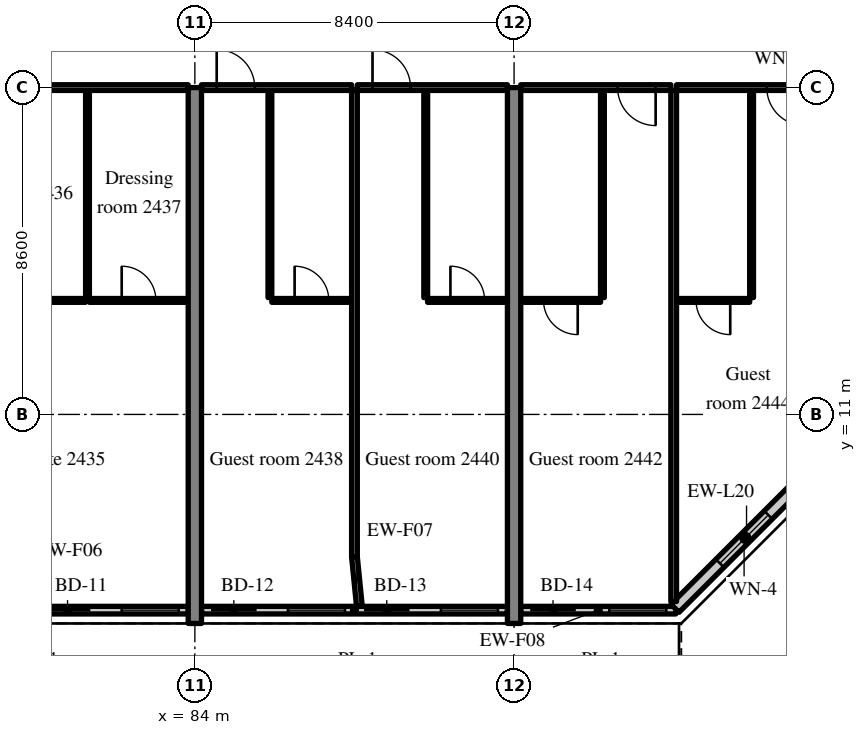
"""IFC4 building model, lengths in metres.
Left out: names, types, materials, properties, quantities, classifications, styles, units other than length and angle.
Written with IfcOpenShell. Run it as: python <this file> out.ifc"""

import sys

from ifc_helpers import new_model, si_unit, direction, frame, frame_2d, origin, place, context, subcontext, project, spatial, rectangle, extrude, source, transform, mapped, element, fill, save


model = new_model("IFC4")
c1 = context("Model", 3, precision=1e-05, world=origin(), true_north=direction((0.0, 1.0)))
c2 = subcontext(c1, "Body", "Model", "MODEL_VIEW")
j1 = project(units=[si_unit("LENGTHUNIT", "METRE"), si_unit("PLANEANGLEUNIT", "RADIAN")], contexts=[c1])
p1 = place(None, origin())
s1 = spatial("IfcSite", under=j1, at=p1, CompositionType="ELEMENT")
p2 = place(p1, origin())
s2 = spatial("IfcBuilding", under=s1, at=p2, CompositionType="ELEMENT")
p3 = place(p2, frame((0.0, 0.0, 102.8)))
s3 = spatial("IfcBuildingStorey", under=s2, at=p3, CompositionType="ELEMENT", Elevation=102.8)
m1 = source(origin(), c2, "Body", "SweptSolid", [
    extrude(rectangle(XDim=14.1, YDim=0.35, at=frame_2d((7.05, 0.0))), origin(), (0.0, 0.0, 1.0), 3.52),
])
for number, where, z_axis, x_axis in (
    (1, (84.0, 5.5, 0.0), (0.0, 0.0, 1.0), (0.0, 1.0, 0.0)),
    (2, (92.4, 5.5, 0.0), (0.0, 0.0, 1.0), (0.0, 1.0, 0.0)),
):
    element("IfcWall", number, at=place(p3, frame(where, z_axis=z_axis, x_axis=x_axis)), inside=s3, PredefinedType="SHEAR", context=c2, shape_type="MappedRepresentation", body=[
        mapped(m1, transform((0.0, 0.0, 0.0), scale=1.0)),
    ])
m2 = source(origin(), c2, "Body", "SweptSolid", [
    extrude(rectangle(XDim=8.05, YDim=0.2, at=frame_2d((4.025, 0.0))), origin(), (0.0, 0.0, 1.0), 2.82),
])
p4 = place(p3, frame((75.775, 5.85, 0.0), z_axis=(0.0, 0.0, 1.0), x_axis=(1.0, 0.0, 0.0)))
e3 = element("IfcWall", 3, at=p4, inside=s3, PredefinedType="SOLIDWALL", context=c2, shape_type="MappedRepresentation", body=[
    mapped(m2, transform((0.0, 0.0, 0.0), scale=1.0)),
])
m3 = source(origin(), c2, "Body", "SweptSolid", [
    extrude(rectangle(XDim=1.2, YDim=2.4, at=frame_2d((0.6, 1.2))), frame((0.0, 0.11, 0.0), z_axis=(0.0, -1.0, 0.0), x_axis=(1.0, 0.0, 0.0)), (0.0, 0.0, 1.0), 0.22),
])
p5 = place(p4, frame((0.25, 0.0, 0.0)))
e4 = element("IfcOpeningElement", 4, at=p5, cuts=e3, PredefinedType="OPENING", context=c2, shape_type="MappedRepresentation", body=[
    mapped(m3, transform((0.0, 0.0, 0.0), scale=1.0)),
])
m4 = source(origin(), c2, "Body", "SweptSolid", [
    extrude(rectangle(XDim=1.5, YDim=1.5, at=frame_2d((0.75, 0.75))), frame((0.0, 0.11, 0.0), z_axis=(0.0, -1.0, 0.0), x_axis=(1.0, 0.0, 0.0)), (0.0, 0.0, 1.0), 0.22),
])
p6 = place(p4, frame((2.275, 0.0, 0.9)))
e5 = element("IfcOpeningElement", 5, at=p6, cuts=e3, PredefinedType="OPENING", context=c2, shape_type="MappedRepresentation", body=[
    mapped(m4, transform((0.0, 0.0, 0.0), scale=1.0)),
])
p7 = place(p4, frame((4.275, 0.0, 0.0)))
e6 = element("IfcOpeningElement", 6, at=p7, cuts=e3, PredefinedType="OPENING", context=c2, shape_type="MappedRepresentation", body=[
    mapped(m3, transform((0.0, 0.0, 0.0), scale=1.0)),
])
p8 = place(p4, frame((6.3, 0.0, 0.9)))
e7 = element("IfcOpeningElement", 7, at=p8, cuts=e3, PredefinedType="OPENING", context=c2, shape_type="MappedRepresentation", body=[
    mapped(m4, transform((0.0, 0.0, 0.0), scale=1.0)),
])
p9 = place(p3, frame((84.175, 5.85, 0.0), z_axis=(0.0, 0.0, 1.0), x_axis=(1.0, 0.0, 0.0)))
e8 = element("IfcWall", 8, at=p9, inside=s3, PredefinedType="SOLIDWALL", context=c2, shape_type="MappedRepresentation", body=[
    mapped(m2, transform((0.0, 0.0, 0.0), scale=1.0)),
])
p10 = place(p9, frame((0.25, 0.0, 0.0)))
e9 = element("IfcOpeningElement", 9, at=p10, cuts=e8, PredefinedType="OPENING", context=c2, shape_type="MappedRepresentation", body=[
    mapped(m3, transform((0.0, 0.0, 0.0), scale=1.0)),
])
p11 = place(p9, frame((2.275, 0.0, 0.9)))
e10 = element("IfcOpeningElement", 10, at=p11, cuts=e8, PredefinedType="OPENING", context=c2, shape_type="MappedRepresentation", body=[
    mapped(m4, transform((0.0, 0.0, 0.0), scale=1.0)),
])
p12 = place(p9, frame((4.275, 0.0, 0.0)))
e11 = element("IfcOpeningElement", 11, at=p12, cuts=e8, PredefinedType="OPENING", context=c2, shape_type="MappedRepresentation", body=[
    mapped(m3, transform((0.0, 0.0, 0.0), scale=1.0)),
])
p13 = place(p9, frame((6.3, 0.0, 0.9)))
e12 = element("IfcOpeningElement", 12, at=p13, cuts=e8, PredefinedType="OPENING", context=c2, shape_type="MappedRepresentation", body=[
    mapped(m4, transform((0.0, 0.0, 0.0), scale=1.0)),
])
m5 = source(origin(), c2, "Body", "SweptSolid", [
    extrude(rectangle(XDim=4.08, YDim=0.2, at=frame_2d((2.04, 0.0))), origin(), (0.0, 0.0, 1.0), 2.82),
])
p14 = place(p3, frame((92.575, 5.85, 0.0), z_axis=(0.0, 0.0, 1.0), x_axis=(1.0, 0.0, 0.0)))
e13 = element("IfcWall", 13, at=p14, inside=s3, PredefinedType="SOLIDWALL", context=c2, shape_type="MappedRepresentation", body=[
    mapped(m5, transform((0.0, 0.0, 0.0), scale=1.0)),
])
p15 = place(p14, frame((0.25, 0.0, 0.0)))
e14 = element("IfcOpeningElement", 14, at=p15, cuts=e13, PredefinedType="OPENING", context=c2, shape_type="MappedRepresentation", body=[
    mapped(m3, transform((0.0, 0.0, 0.0), scale=1.0)),
])
p16 = place(p14, frame((2.33, 0.0, 0.9)))
e15 = element("IfcOpeningElement", 15, at=p16, cuts=e13, PredefinedType="OPENING", context=c2, shape_type="MappedRepresentation", body=[
    mapped(m4, transform((0.0, 0.0, 0.0), scale=1.0)),
])
m6 = source(origin(), c2, "Body", "SweptSolid", [
    extrude(rectangle(XDim=5.326, YDim=0.3, at=frame_2d((2.663, 0.0))), origin(), (0.0, 0.0, 1.0), 3.52),
])
p17 = place(p3, frame((96.634, 5.9, 0.0), z_axis=(0.0, 0.0, 1.0), x_axis=(0.707083859269, 0.707129702361, 0.0)))
e16 = element("IfcWall", 16, at=p17, inside=s3, PredefinedType="SOLIDWALL", context=c2, shape_type="MappedRepresentation", body=[
    mapped(m6, transform((0.0, 0.0, 0.0), scale=1.0)),
])
m7 = source(origin(), c2, "Body", "SweptSolid", [
    extrude(rectangle(XDim=1.8, YDim=1.5, at=frame_2d((0.9, 0.75))), frame((0.0, 0.16, 0.0), z_axis=(0.0, -1.0, 0.0), x_axis=(1.0, 0.0, 0.0)), (0.0, 0.0, 1.0), 0.32),
])
p18 = place(p17, frame((1.672, 0.0, 0.9)))
e17 = element("IfcOpeningElement", 17, at=p18, cuts=e16, PredefinedType="OPENING", context=c2, shape_type="MappedRepresentation", body=[
    mapped(m7, transform((0.0, 0.0, 0.0), scale=1.0)),
])
m8 = source(origin(), c2, "Body", "SweptSolid", [
    extrude(rectangle(XDim=5.45, YDim=0.1, at=frame_2d((2.725, 0.0))), origin(), (0.0, 0.0, 1.0), 3.52),
])
p19 = place(p3, frame((81.175, 14.075, 0.0), z_axis=(0.0, 0.0, 1.0), x_axis=(0.0, 1.0, 0.0)))
e18 = element("IfcWall", 18, at=p19, inside=s3, PredefinedType="PARTITIONING", context=c2, shape_type="MappedRepresentation", body=[
    mapped(m8, transform((0.0, 0.0, 0.0), scale=1.0)),
])
m9 = source(origin(), c2, "Body", "SweptSolid", [
    extrude(rectangle(XDim=3.5, YDim=0.1, at=frame_2d((1.75, 0.0))), origin(), (0.0, 0.0, 1.0), 3.52),
])
p20 = place(p3, frame((77.625, 14.0, 0.0), z_axis=(0.0, 0.0, 1.0), x_axis=(1.0, 0.0, 0.0)))
e19 = element("IfcWall", 19, at=p20, inside=s3, PredefinedType="PARTITIONING", context=c2, shape_type="MappedRepresentation", body=[
    mapped(m9, transform((0.0, 0.0, 0.0), scale=1.0)),
])
m10 = source(origin(), c2, "Body", "SweptSolid", [
    extrude(rectangle(XDim=0.9, YDim=2.1, at=frame_2d((0.45, 1.05))), frame((0.0, 0.06, 0.0), z_axis=(0.0, -1.0, 0.0), x_axis=(1.0, 0.0, 0.0)), (0.0, 0.0, 1.0), 0.12),
])
p21 = place(p20, frame((1.3, 0.0, 0.0)))
e20 = element("IfcOpeningElement", 20, at=p21, cuts=e19, PredefinedType="OPENING", context=c2, shape_type="MappedRepresentation", body=[
    mapped(m10, transform((0.0, 0.0, 0.0), scale=1.0)),
])
m11 = source(origin(), c2, "Body", "SweptSolid", [
    extrude(rectangle(XDim=2.6, YDim=0.1, at=frame_2d((1.3, 0.0))), origin(), (0.0, 0.0, 1.0), 3.52),
])
p22 = place(p3, frame((81.225, 14.0, 0.0), z_axis=(0.0, 0.0, 1.0), x_axis=(1.0, 0.0, 0.0)))
e21 = element("IfcWall", 21, at=p22, inside=s3, PredefinedType="PARTITIONING", context=c2, shape_type="MappedRepresentation", body=[
    mapped(m11, transform((0.0, 0.0, 0.0), scale=1.0)),
])
p23 = place(p22, frame((0.85, 0.0, 0.0)))
e22 = element("IfcOpeningElement", 22, at=p23, cuts=e21, PredefinedType="OPENING", context=c2, shape_type="MappedRepresentation", body=[
    mapped(m10, transform((0.0, 0.0, 0.0), scale=1.0)),
])
m12 = source(origin(), c2, "Body", "SweptSolid", [
    extrude(rectangle(XDim=8.05, YDim=0.15, at=frame_2d((4.025, 0.0))), origin(), (0.0, 0.0, 1.0), 2.82),
])
p24 = place(p3, frame((75.775, 19.6, 0.0), z_axis=(0.0, 0.0, 1.0), x_axis=(1.0, 0.0, 0.0)))
e23 = element("IfcWall", 23, at=p24, inside=s3, PredefinedType="PARTITIONING", context=c2, shape_type="MappedRepresentation", body=[
    mapped(m12, transform((0.0, 0.0, 0.0), scale=1.0)),
])
m13 = source(origin(), c2, "Body", "SweptSolid", [
    extrude(rectangle(XDim=1.0, YDim=2.1, at=frame_2d((0.5, 1.05))), frame((0.0, 0.085, 0.0), z_axis=(0.0, -1.0, 0.0), x_axis=(1.0, 0.0, 0.0)), (0.0, 0.0, 1.0), 0.17),
])
p25 = place(p24, frame((0.4, 0.0, 0.0)))
e24 = element("IfcOpeningElement", 24, at=p25, cuts=e23, PredefinedType="OPENING", context=c2, shape_type="MappedRepresentation", body=[
    mapped(m13, transform((0.0, 0.0, 0.0), scale=1.0)),
])
p26 = place(p3, frame((85.975, 14.075, 0.0), z_axis=(0.0, 0.0, 1.0), x_axis=(0.0, 1.0, 0.0)))
e25 = element("IfcWall", 25, at=p26, inside=s3, PredefinedType="PARTITIONING", context=c2, shape_type="MappedRepresentation", body=[
    mapped(m8, transform((0.0, 0.0, 0.0), scale=1.0)),
])
m14 = source(origin(), c2, "Body", "SweptSolid", [
    extrude(rectangle(XDim=2.1, YDim=0.1, at=frame_2d((1.05, 0.0))), origin(), (0.0, 0.0, 1.0), 3.52),
])
p27 = place(p3, frame((86.025, 14.0, 0.0), z_axis=(0.0, 0.0, 1.0), x_axis=(1.0, 0.0, 0.0)))
e26 = element("IfcWall", 26, at=p27, inside=s3, PredefinedType="PARTITIONING", context=c2, shape_type="MappedRepresentation", body=[
    mapped(m14, transform((0.0, 0.0, 0.0), scale=1.0)),
])
p28 = place(p27, frame((0.6, 0.0, 0.0)))
e27 = element("IfcOpeningElement", 27, at=p28, cuts=e26, PredefinedType="OPENING", context=c2, shape_type="MappedRepresentation", body=[
    mapped(m10, transform((0.0, 0.0, 0.0), scale=1.0)),
])
m15 = source(origin(), c2, "Body", "SweptSolid", [
    extrude(rectangle(XDim=3.95, YDim=0.15, at=frame_2d((1.975, 0.0))), origin(), (0.0, 0.0, 1.0), 2.82),
])
p29 = place(p3, frame((84.175, 19.6, 0.0), z_axis=(0.0, 0.0, 1.0), x_axis=(1.0, 0.0, 0.0)))
e28 = element("IfcWall", 28, at=p29, inside=s3, PredefinedType="PARTITIONING", context=c2, shape_type="MappedRepresentation", body=[
    mapped(m15, transform((0.0, 0.0, 0.0), scale=1.0)),
])
p30 = place(p29, frame((0.4, 0.0, 0.0)))
e29 = element("IfcOpeningElement", 29, at=p30, cuts=e28, PredefinedType="OPENING", context=c2, shape_type="MappedRepresentation", body=[
    mapped(m13, transform((0.0, 0.0, 0.0), scale=1.0)),
])
p31 = place(p3, frame((90.075, 14.075, 0.0), z_axis=(0.0, 0.0, 1.0), x_axis=(0.0, 1.0, 0.0)))
e30 = element("IfcWall", 30, at=p31, inside=s3, PredefinedType="PARTITIONING", context=c2, shape_type="MappedRepresentation", body=[
    mapped(m8, transform((0.0, 0.0, 0.0), scale=1.0)),
])
p32 = place(p3, frame((90.125, 14.0, 0.0), z_axis=(0.0, 0.0, 1.0), x_axis=(1.0, 0.0, 0.0)))
e31 = element("IfcWall", 31, at=p32, inside=s3, PredefinedType="PARTITIONING", context=c2, shape_type="MappedRepresentation", body=[
    mapped(m14, transform((0.0, 0.0, 0.0), scale=1.0)),
])
p33 = place(p32, frame((0.6, 0.0, 0.0)))
e32 = element("IfcOpeningElement", 32, at=p33, cuts=e31, PredefinedType="OPENING", context=c2, shape_type="MappedRepresentation", body=[
    mapped(m10, transform((0.0, 0.0, 0.0), scale=1.0)),
])
m16 = source(origin(), c2, "Body", "SweptSolid", [
    extrude(rectangle(XDim=3.95, YDim=0.15, at=frame_2d((1.975, 0.0))), origin(), (0.0, 0.0, 1.0), 2.82),
])
p34 = place(p3, frame((88.275, 19.6, 0.0), z_axis=(0.0, 0.0, 1.0), x_axis=(1.0, 0.0, 0.0)))
e33 = element("IfcWall", 33, at=p34, inside=s3, PredefinedType="PARTITIONING", context=c2, shape_type="MappedRepresentation", body=[
    mapped(m16, transform((0.0, 0.0, 0.0), scale=1.0)),
])
p35 = place(p34, frame((0.4, 0.0, 0.0)))
e34 = element("IfcOpeningElement", 34, at=p35, cuts=e33, PredefinedType="OPENING", context=c2, shape_type="MappedRepresentation", body=[
    mapped(m13, transform((0.0, 0.0, 0.0), scale=1.0)),
])
m17 = source(origin(), c2, "Body", "SweptSolid", [
    extrude(rectangle(XDim=12.275, YDim=0.15, at=frame_2d((6.137, 0.0))), origin(), (0.0, 0.0, 1.0), 3.52),
])
p36 = place(p3, frame((88.2, 7.25, 0.0), z_axis=(0.0, 0.0, 1.0), x_axis=(0.0, 1.0, 0.0)))
e35 = element("IfcWall", 35, at=p36, inside=s3, PredefinedType="PARTITIONING", context=c2, shape_type="MappedRepresentation", body=[
    mapped(m17, transform((0.0, 0.0, 0.0), scale=1.0)),
])
p37 = place(p3, frame((94.725, 14.075, 0.0), z_axis=(0.0, 0.0, 1.0), x_axis=(0.0, 1.0, 0.0)))
e36 = element("IfcWall", 36, at=p37, inside=s3, PredefinedType="PARTITIONING", context=c2, shape_type="MappedRepresentation", body=[
    mapped(m8, transform((0.0, 0.0, 0.0), scale=1.0)),
])
p38 = place(p3, frame((92.575, 14.0, 0.0), z_axis=(0.0, 0.0, 1.0), x_axis=(1.0, 0.0, 0.0)))
e37 = element("IfcWall", 37, at=p38, inside=s3, PredefinedType="PARTITIONING", context=c2, shape_type="MappedRepresentation", body=[
    mapped(m14, transform((0.0, 0.0, 0.0), scale=1.0)),
])
p39 = place(p38, frame((0.6, 0.0, 0.0)))
e38 = element("IfcOpeningElement", 38, at=p39, cuts=e37, PredefinedType="OPENING", context=c2, shape_type="MappedRepresentation", body=[
    mapped(m10, transform((0.0, 0.0, 0.0), scale=1.0)),
])
p40 = place(p3, frame((92.575, 19.6, 0.0), z_axis=(0.0, 0.0, 1.0), x_axis=(1.0, 0.0, 0.0)))
e39 = element("IfcWall", 39, at=p40, inside=s3, PredefinedType="PARTITIONING", context=c2, shape_type="MappedRepresentation", body=[
    mapped(m15, transform((0.0, 0.0, 0.0), scale=1.0)),
])
p41 = place(p40, frame((2.55, 0.0, 0.0)))
e40 = element("IfcOpeningElement", 40, at=p41, cuts=e39, PredefinedType="OPENING", context=c2, shape_type="MappedRepresentation", body=[
    mapped(m13, transform((0.0, 0.0, 0.0), scale=1.0)),
])
p42 = place(p3, frame((98.65, 14.075, 0.0), z_axis=(0.0, 0.0, 1.0), x_axis=(0.0, 1.0, 0.0)))
e41 = element("IfcWall", 41, at=p42, inside=s3, PredefinedType="PARTITIONING", context=c2, shape_type="MappedRepresentation", body=[
    mapped(m8, transform((0.0, 0.0, 0.0), scale=1.0)),
])
m18 = source(origin(), c2, "Body", "SweptSolid", [
    extrude(rectangle(XDim=1.925, YDim=0.1, at=frame_2d((0.962, 0.0))), origin(), (0.0, 0.0, 1.0), 3.52),
])
p43 = place(p3, frame((96.675, 14.0, 0.0), z_axis=(0.0, 0.0, 1.0), x_axis=(1.0, 0.0, 0.0)))
e42 = element("IfcWall", 42, at=p43, inside=s3, PredefinedType="PARTITIONING", context=c2, shape_type="MappedRepresentation", body=[
    mapped(m18, transform((0.0, 0.0, 0.0), scale=1.0)),
])
p44 = place(p43, frame((0.513, 0.0, 0.0)))
e43 = element("IfcOpeningElement", 43, at=p44, cuts=e42, PredefinedType="OPENING", context=c2, shape_type="MappedRepresentation", body=[
    mapped(m10, transform((0.0, 0.0, 0.0), scale=1.0)),
])
m19 = source(origin(), c2, "Body", "SweptSolid", [
    extrude(rectangle(XDim=3.775, YDim=0.15, at=frame_2d((1.887, 0.0))), origin(), (0.0, 0.0, 1.0), 2.82),
])
p45 = place(p3, frame((96.675, 19.6, 0.0), z_axis=(0.0, 0.0, 1.0), x_axis=(1.0, 0.0, 0.0)))
e44 = element("IfcWall", 44, at=p45, inside=s3, PredefinedType="PARTITIONING", context=c2, shape_type="MappedRepresentation", body=[
    mapped(m19, transform((0.0, 0.0, 0.0), scale=1.0)),
])
p46 = place(p45, frame((2.375, 0.0, 0.0)))
e45 = element("IfcOpeningElement", 45, at=p46, cuts=e44, PredefinedType="OPENING", context=c2, shape_type="MappedRepresentation", body=[
    mapped(m13, transform((0.0, 0.0, 0.0), scale=1.0)),
])
m20 = source(origin(), c2, "Body", "SweptSolid", [
    extrude(rectangle(XDim=13.447, YDim=0.15, at=frame_2d((6.724, 0.0))), origin(), (0.0, 0.0, 1.0), 3.52),
])
p47 = place(p3, frame((96.6, 6.078, 0.0), z_axis=(0.0, 0.0, 1.0), x_axis=(0.0, 1.0, 0.0)))
e46 = element("IfcWall", 46, at=p47, inside=s3, PredefinedType="PARTITIONING", context=c2, shape_type="MappedRepresentation", body=[
    mapped(m20, transform((0.0, 0.0, 0.0), scale=1.0)),
])
m21 = source(origin(), c2, "Body", "SweptSolid", [
    extrude(rectangle(XDim=1.307, YDim=0.15, at=frame_2d((0.653, 0.0))), origin(), (0.0, 0.0, 1.0), 3.52),
])
p48 = place(p3, frame((88.33, 5.95, 0.0), z_axis=(0.0, 0.0, 1.0), x_axis=(-0.099596223396, 0.99502793543, 0.0)))
e47 = element("IfcWall", 47, at=p48, inside=s3, PredefinedType="PARTITIONING", context=c2, shape_type="MappedRepresentation", body=[
    mapped(m21, transform((0.0, 0.0, 0.0), scale=1.0)),
])
m22 = source(origin(), c2, "Body", "SweptSolid", [
    extrude(rectangle(XDim=1.2, YDim=2.4, at=frame_2d((0.6, 1.2))), frame((0.0, 0.025, 0.0), z_axis=(0.0, -1.0, 0.0), x_axis=(1.0, 0.0, 0.0)), (0.0, 0.0, 1.0), 0.05),
])
p49 = place(p7, origin())
e48 = element("IfcDoor", 48, at=p49, inside=s3, OperationType="SLIDING_TO_LEFT", PredefinedType="DOOR", context=c2, shape_type="MappedRepresentation", body=[
    mapped(m22, transform((0.0, 0.0, 0.0), scale=1.0)),
])
fill(e6, e48)
m23 = source(origin(), c2, "Body", "SweptSolid", [
    extrude(rectangle(XDim=1.5, YDim=1.5, at=frame_2d((0.75, 0.75))), frame((0.0, 0.03, 0.0), z_axis=(0.0, -1.0, 0.0), x_axis=(1.0, 0.0, 0.0)), (0.0, 0.0, 1.0), 0.06),
])
p50 = place(p8, origin())
e49 = element("IfcWindow", 49, at=p50, inside=s3, PartitioningType="SINGLE_PANEL", PredefinedType="WINDOW", context=c2, shape_type="MappedRepresentation", body=[
    mapped(m23, transform((0.0, 0.0, 0.0), scale=1.0)),
])
fill(e7, e49)
p51 = place(p10, origin())
e50 = element("IfcDoor", 50, at=p51, inside=s3, OperationType="SLIDING_TO_RIGHT", PredefinedType="DOOR", context=c2, shape_type="MappedRepresentation", body=[
    mapped(m22, transform((0.0, 0.0, 0.0), scale=1.0)),
])
fill(e9, e50)
p52 = place(p11, origin())
e51 = element("IfcWindow", 51, at=p52, inside=s3, PartitioningType="SINGLE_PANEL", PredefinedType="WINDOW", context=c2, shape_type="MappedRepresentation", body=[
    mapped(m23, transform((0.0, 0.0, 0.0), scale=1.0)),
])
fill(e10, e51)
p53 = place(p12, origin())
e52 = element("IfcDoor", 52, at=p53, inside=s3, OperationType="SLIDING_TO_LEFT", PredefinedType="DOOR", context=c2, shape_type="MappedRepresentation", body=[
    mapped(m22, transform((0.0, 0.0, 0.0), scale=1.0)),
])
fill(e11, e52)
p54 = place(p13, origin())
e53 = element("IfcWindow", 53, at=p54, inside=s3, PartitioningType="SINGLE_PANEL", PredefinedType="WINDOW", context=c2, shape_type="MappedRepresentation", body=[
    mapped(m23, transform((0.0, 0.0, 0.0), scale=1.0)),
])
fill(e12, e53)
p55 = place(p15, origin())
e54 = element("IfcDoor", 54, at=p55, inside=s3, OperationType="SLIDING_TO_RIGHT", PredefinedType="DOOR", context=c2, shape_type="MappedRepresentation", body=[
    mapped(m22, transform((0.0, 0.0, 0.0), scale=1.0)),
])
fill(e14, e54)
p56 = place(p16, origin())
e55 = element("IfcWindow", 55, at=p56, inside=s3, PartitioningType="SINGLE_PANEL", PredefinedType="WINDOW", context=c2, shape_type="MappedRepresentation", body=[
    mapped(m23, transform((0.0, 0.0, 0.0), scale=1.0)),
])
fill(e15, e55)
m24 = source(origin(), c2, "Body", "SweptSolid", [
    extrude(rectangle(XDim=1.8, YDim=1.5, at=frame_2d((0.9, 0.75))), frame((0.0, 0.03, 0.0), z_axis=(0.0, -1.0, 0.0), x_axis=(1.0, 0.0, 0.0)), (0.0, 0.0, 1.0), 0.06),
])
p57 = place(p18, origin())
e56 = element("IfcWindow", 56, at=p57, inside=s3, PartitioningType="SINGLE_PANEL", PredefinedType="WINDOW", context=c2, shape_type="MappedRepresentation", body=[
    mapped(m24, transform((0.0, 0.0, 0.0), scale=1.0)),
])
fill(e17, e56)
m25 = source(origin(), c2, "Body", "SweptSolid", [
    extrude(rectangle(XDim=0.9, YDim=2.1, at=frame_2d((0.45, 1.05))), frame((0.0, 0.025, 0.0), z_axis=(0.0, -1.0, 0.0), x_axis=(1.0, 0.0, 0.0)), (0.0, 0.0, 1.0), 0.05),
])
p58 = place(p23, origin())
e57 = element("IfcDoor", 57, at=p58, inside=s3, OperationType="SINGLE_SWING_LEFT", PredefinedType="DOOR", context=c2, shape_type="MappedRepresentation", body=[
    mapped(m25, transform((0.0, 0.0, 0.0), scale=1.0)),
])
fill(e22, e57)
p59 = place(p28, origin())
e58 = element("IfcDoor", 58, at=p59, inside=s3, OperationType="SINGLE_SWING_LEFT", PredefinedType="DOOR", context=c2, shape_type="MappedRepresentation", body=[
    mapped(m25, transform((0.0, 0.0, 0.0), scale=1.0)),
])
fill(e27, e58)
m26 = source(origin(), c2, "Body", "SweptSolid", [
    extrude(rectangle(XDim=1.0, YDim=2.1, at=frame_2d((0.5, 1.05))), frame((0.0, 0.025, 0.0), z_axis=(0.0, -1.0, 0.0), x_axis=(1.0, 0.0, 0.0)), (0.0, 0.0, 1.0), 0.05),
])
p60 = place(p30, origin())
e59 = element("IfcDoor", 59, at=p60, inside=s3, OperationType="SINGLE_SWING_LEFT", PredefinedType="DOOR", context=c2, shape_type="MappedRepresentation", body=[
    mapped(m26, transform((0.0, 0.0, 0.0), scale=1.0)),
])
fill(e29, e59)
p61 = place(p33, origin())
e60 = element("IfcDoor", 60, at=p61, inside=s3, OperationType="SINGLE_SWING_LEFT", PredefinedType="DOOR", context=c2, shape_type="MappedRepresentation", body=[
    mapped(m25, transform((0.0, 0.0, 0.0), scale=1.0)),
])
fill(e32, e60)
p62 = place(p35, origin())
e61 = element("IfcDoor", 61, at=p62, inside=s3, OperationType="SINGLE_SWING_LEFT", PredefinedType="DOOR", context=c2, shape_type="MappedRepresentation", body=[
    mapped(m26, transform((0.0, 0.0, 0.0), scale=1.0)),
])
fill(e34, e61)
p63 = place(p39, origin())
e62 = element("IfcDoor", 62, at=p63, inside=s3, OperationType="SINGLE_SWING_RIGHT", PredefinedType="DOOR", context=c2, shape_type="MappedRepresentation", body=[
    mapped(m25, transform((0.0, 0.0, 0.0), scale=1.0)),
])
fill(e38, e62)
p64 = place(p41, origin())
e63 = element("IfcDoor", 63, at=p64, inside=s3, OperationType="SINGLE_SWING_RIGHT", PredefinedType="DOOR", context=c2, shape_type="MappedRepresentation", body=[
    mapped(m26, transform((0.0, 0.0, 0.0), scale=1.0)),
])
fill(e40, e63)
p65 = place(p44, origin())
e64 = element("IfcDoor", 64, at=p65, inside=s3, OperationType="SINGLE_SWING_RIGHT", PredefinedType="DOOR", context=c2, shape_type="MappedRepresentation", body=[
    mapped(m25, transform((0.0, 0.0, 0.0), scale=1.0)),
])
fill(e43, e64)
p66 = place(p46, origin())
e65 = element("IfcDoor", 65, at=p66, inside=s3, OperationType="SINGLE_SWING_RIGHT", PredefinedType="DOOR", context=c2, shape_type="MappedRepresentation", body=[
    mapped(m26, transform((0.0, 0.0, 0.0), scale=1.0)),
])
fill(e45, e65)
save(model, sys.argv[1])
